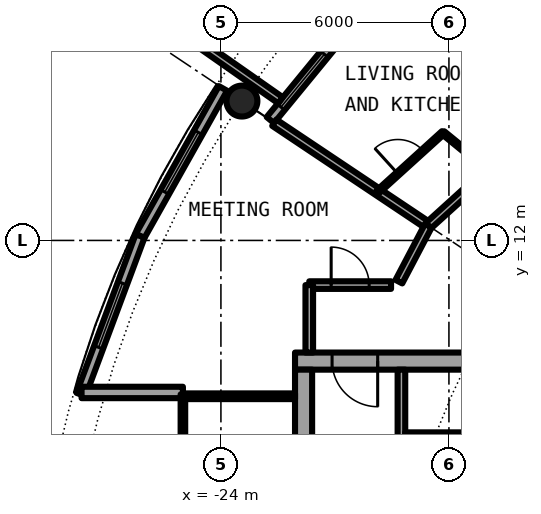
"""IFC4 building model, lengths in metres.
Left out: names, types, materials, properties, quantities, classifications, styles, units other than length and angle.
Written with IfcOpenShell. Run it as: python <this file> out.ifc"""

import sys

from ifc_helpers import new_model, si_unit, direction, frame, frame_2d, origin, origin_2d, place, context, subcontext, project, spatial, rectangle, hollow_circle, extrude, element, fill, save


model = new_model("IFC4")
c1 = context("Model", 3, precision=1e-05, world=origin(), true_north=direction((0.0, 1.0)))
c2 = subcontext(c1, "Body", "Model", "MODEL_VIEW")
j1 = project(units=[si_unit("LENGTHUNIT", "METRE"), si_unit("PLANEANGLEUNIT", "RADIAN")], contexts=[c1])
p1 = place(None, origin())
s1 = spatial("IfcSite", under=j1, at=p1, CompositionType="ELEMENT")
p2 = place(p1, origin())
s2 = spatial("IfcBuilding", under=s1, at=p2, CompositionType="ELEMENT")
p3 = place(p2, frame((0.0, 0.0, 190.2)))
s3 = spatial("IfcBuildingStorey", under=s2, at=p3, CompositionType="ELEMENT", Elevation=190.2)
p4 = place(p3, frame((-23.448, 15.667, 0.0), z_axis=(0.0, 0.0, 1.0), x_axis=(1.0, 0.0, 0.0)))
e1 = element("IfcColumn", 1, at=p4, inside=s3, PredefinedType="COLUMN", context=c2, shape_type="SweptSolid", body=[
    extrude(hollow_circle(Radius=0.406, WallThickness=0.03, at=origin_2d()), origin(), (0.0, 0.0, 1.0), 3.05),
])
p5 = place(p3, frame((-19.304, 19.304, 0.0), z_axis=(0.0, 0.0, 1.0), x_axis=(-0.634382322723, -0.773019449054, 0.0)))
e2 = element("IfcWall", 2, at=p5, inside=s3, PredefinedType="SOLIDWALL", context=c2, shape_type="SweptSolid", body=[
    extrude(rectangle(XDim=5.352, YDim=0.25, at=frame_2d((2.676, 0.0))), origin(), (0.0, 0.0, 1.0), 2.7),
])
p6 = place(p5, frame((0.841, 0.0, 0.0)))
e3 = element("IfcOpeningElement", 3, at=p6, cuts=e2, PredefinedType="OPENING", context=c2, shape_type="SweptSolid", body=[
    extrude(rectangle(XDim=1.0, YDim=2.2, at=frame_2d((0.5, 1.1))), frame((0.0, 0.135, 0.0), z_axis=(0.0, -1.0, 0.0), x_axis=(1.0, 0.0, 0.0)), (0.0, 0.0, 1.0), 0.27),
])
p7 = place(p5, frame((3.111, 0.0, 0.3)))
e4 = element("IfcOpeningElement", 4, at=p7, cuts=e2, PredefinedType="OPENING", context=c2, shape_type="SweptSolid", body=[
    extrude(rectangle(XDim=1.8, YDim=2.1, at=frame_2d((0.9, 1.05))), frame((0.0, 0.135, 0.0), z_axis=(0.0, -1.0, 0.0), x_axis=(1.0, 0.0, 0.0)), (0.0, 0.0, 1.0), 0.27),
])
p8 = place(p3, frame((-22.433, 15.688, -0.03), z_axis=(0.0, 0.0, 1.0), x_axis=(-0.819373043115, 0.573260687834, 0.0)))
e5 = element("IfcWall", 5, at=p8, inside=s3, PredefinedType="SOLIDWALL", context=c2, shape_type="SweptSolid", body=[
    extrude(rectangle(XDim=2.925, YDim=0.2, at=frame_2d((1.463, 0.0))), origin(), (0.0, 0.0, 1.0), 2.73),
])
p9 = place(p3, frame((-23.946, 16.0, 0.0), z_axis=(0.0, 0.0, 1.0), x_axis=(-0.489696356642, -0.871893042919, 0.0)))
e6 = element("IfcWall", 6, at=p9, inside=s3, PredefinedType="SOLIDWALL", context=c2, shape_type="SweptSolid", body=[
    extrude(rectangle(XDim=4.454, YDim=0.25, at=frame_2d((2.227, 0.0))), origin(), (0.0, 0.0, 1.0), 2.7),
])
p10 = place(p9, frame((1.327, 0.0, 0.3)))
e7 = element("IfcOpeningElement", 7, at=p10, cuts=e6, PredefinedType="OPENING", context=c2, shape_type="SweptSolid", body=[
    extrude(rectangle(XDim=1.8, YDim=2.1, at=frame_2d((0.9, 1.05))), frame((0.0, 0.135, 0.0), z_axis=(0.0, -1.0, 0.0), x_axis=(1.0, 0.0, 0.0)), (0.0, 0.0, 1.0), 0.27),
])
p11 = place(p3, frame((-26.127, 12.117, 0.0), z_axis=(0.0, 0.0, 1.0), x_axis=(-0.349247811493, -0.937030397675, 0.0)))
e8 = element("IfcWall", 8, at=p11, inside=s3, PredefinedType="SOLIDWALL", context=c2, shape_type="SweptSolid", body=[
    extrude(rectangle(XDim=4.452, YDim=0.25, at=frame_2d((2.226, 0.0))), origin(), (0.0, 0.0, 1.0), 2.7),
])
p12 = place(p11, frame((1.327, 0.0, 0.3)))
e9 = element("IfcOpeningElement", 9, at=p12, cuts=e8, PredefinedType="OPENING", context=c2, shape_type="SweptSolid", body=[
    extrude(rectangle(XDim=1.8, YDim=2.1, at=frame_2d((0.9, 1.05))), frame((0.0, 0.135, 0.0), z_axis=(0.0, -1.0, 0.0), x_axis=(1.0, 0.0, 0.0)), (0.0, 0.0, 1.0), 0.27),
])
p13 = place(p3, frame((-25.0, 8.0, 0.0), z_axis=(0.0, 0.0, 1.0), x_axis=(-1.0, 0.0, 0.0)))
e10 = element("IfcWall", 10, at=p13, inside=s3, PredefinedType="SOLIDWALL", context=c2, shape_type="SweptSolid", body=[
    extrude(rectangle(XDim=2.667, YDim=0.3, at=frame_2d((1.333, 0.0))), origin(), (0.0, 0.0, 1.0), 2.7),
])
p14 = place(p3, frame((-8.55, 8.825, 0.0), z_axis=(0.0, 0.0, 1.0), x_axis=(-1.0, 0.0, 0.0)))
e11 = element("IfcWall", 11, at=p14, inside=s3, PredefinedType="SHEAR", context=c2, shape_type="SweptSolid", body=[
    extrude(rectangle(XDim=13.5, YDim=0.45, at=frame_2d((6.75, 0.0))), origin(), (0.0, 0.0, 1.0), 3.05),
])
p15 = place(p14, frame((11.325, 0.0, 0.0)))
e12 = element("IfcOpeningElement", 12, at=p15, cuts=e11, PredefinedType="OPENING", context=c2, shape_type="SweptSolid", body=[
    extrude(rectangle(XDim=1.2, YDim=2.3, at=frame_2d((0.6, 1.15))), frame((0.0, 0.235, 0.0), z_axis=(0.0, -1.0, 0.0), x_axis=(1.0, 0.0, 0.0)), (0.0, 0.0, 1.0), 0.47),
])
p16 = place(p3, frame((-21.825, -8.6, 0.0), z_axis=(0.0, 0.0, 1.0), x_axis=(0.0, 1.0, 0.0)))
e13 = element("IfcWall", 13, at=p16, inside=s3, PredefinedType="SHEAR", context=c2, shape_type="SweptSolid", body=[
    extrude(rectangle(XDim=17.2, YDim=0.45, at=frame_2d((8.6, 0.0))), origin(), (0.0, 0.0, 1.0), 3.05),
])
p17 = place(p16, frame((7.7, 0.0, 0.0)))
e14 = element("IfcOpeningElement", 14, at=p17, cuts=e13, PredefinedType="OPENING", context=c2, shape_type="SweptSolid", body=[
    extrude(rectangle(XDim=1.8, YDim=2.3, at=frame_2d((0.9, 1.15))), frame((0.0, 0.235, 0.0), z_axis=(0.0, -1.0, 0.0), x_axis=(1.0, 0.0, 0.0)), (0.0, 0.0, 1.0), 0.47),
])
p18 = place(p3, frame((-19.25, 8.6, 0.0), z_axis=(0.0, 0.0, 1.0), x_axis=(0.0, -1.0, 0.0)))
e15 = element("IfcWall", 15, at=p18, inside=s3, PredefinedType="SOLIDWALL", context=c2, shape_type="SweptSolid", body=[
    extrude(rectangle(XDim=7.025, YDim=0.2, at=frame_2d((3.513, 0.0))), origin(), (0.0, 0.0, 1.0), 2.7),
])
p19 = place(p18, frame((2.35, 0.0, 0.0)))
e16 = element("IfcOpeningElement", 16, at=p19, cuts=e15, PredefinedType="OPENING", context=c2, shape_type="SweptSolid", body=[
    extrude(rectangle(XDim=1.1, YDim=2.3, at=frame_2d((0.55, 1.15))), frame((0.0, 0.11, 0.0), z_axis=(0.0, -1.0, 0.0), x_axis=(1.0, 0.0, 0.0)), (0.0, 0.0, 1.0), 0.22),
])
p20 = place(p3, frame((-15.45, 6.875, 0.0), z_axis=(0.0, 0.0, 1.0), x_axis=(-1.0, 0.0, 0.0)))
e17 = element("IfcWall", 17, at=p20, inside=s3, PredefinedType="PARTITIONING", context=c2, shape_type="SweptSolid", body=[
    extrude(rectangle(XDim=3.7, YDim=0.15, at=frame_2d((1.85, 0.0))), origin(), (0.0, 0.0, 1.0), 2.7),
])
p21 = place(p20, frame((1.4, 0.0, 0.0)))
e18 = element("IfcOpeningElement", 18, at=p21, cuts=e17, PredefinedType="OPENING", context=c2, shape_type="SweptSolid", body=[
    extrude(rectangle(XDim=0.9, YDim=2.3, at=frame_2d((0.45, 1.15))), frame((0.0, 0.085, 0.0), z_axis=(0.0, -1.0, 0.0), x_axis=(1.0, 0.0, 0.0)), (0.0, 0.0, 1.0), 0.17),
])
p22 = place(p3, frame((-22.05, 7.9, 0.0), z_axis=(0.0, 0.0, 1.0), x_axis=(-1.0, 0.0, 0.0)))
e19 = element("IfcWall", 19, at=p22, inside=s3, PredefinedType="PARTITIONING", context=c2, shape_type="SweptSolid", body=[
    extrude(rectangle(XDim=2.89, YDim=0.15, at=frame_2d((1.445, 0.0))), origin(), (0.0, 0.0, 1.0), 2.7),
])
p23 = place(p3, frame((-25.0, 7.95, 0.0), z_axis=(0.0, 0.0, 1.0), x_axis=(0.0, -1.0, 0.0)))
e20 = element("IfcWall", 20, at=p23, inside=s3, PredefinedType="PARTITIONING", context=c2, shape_type="SweptSolid", body=[
    extrude(rectangle(XDim=15.9, YDim=0.12, at=frame_2d((7.95, 0.0))), origin(), (0.0, 0.0, 1.0), 2.7),
])
p24 = place(p23, frame((0.95, 0.0, 0.1)))
e21 = element("IfcOpeningElement", 21, at=p24, cuts=e20, PredefinedType="OPENING", context=c2, shape_type="SweptSolid", body=[
    extrude(rectangle(XDim=14.0, YDim=2.35, at=frame_2d((7.0, 1.175))), frame((0.0, 0.07, 0.0), z_axis=(0.0, -1.0, 0.0), x_axis=(1.0, 0.0, 0.0)), (0.0, 0.0, 1.0), 0.14),
])
p25 = place(p3, frame((-22.595, 15.098, 0.0), z_axis=(0.0, 0.0, 1.0), x_axis=(0.831387096605, -0.55569370664, 0.0)))
e22 = element("IfcWall", 22, at=p25, inside=s3, PredefinedType="PARTITIONING", context=c2, shape_type="SweptSolid", body=[
    extrude(rectangle(XDim=4.875, YDim=0.2, at=frame_2d((2.438, 0.0))), origin(), (0.0, 0.0, 1.0), 2.7),
])
p26 = place(p3, frame((-19.234, 19.197, 0.0), z_axis=(0.0, 0.0, 1.0), x_axis=(0.707722727509, -0.706490297858, 0.0)))
e23 = element("IfcWall", 23, at=p26, inside=s3, PredefinedType="PARTITIONING", context=c2, shape_type="SweptSolid", body=[
    extrude(rectangle(XDim=3.962, YDim=0.1, at=frame_2d((1.981, 0.0))), origin(), (0.0, 0.0, 1.0), 2.7),
])
p27 = place(p26, frame((1.531, 0.0, 0.0)))
e24 = element("IfcOpeningElement", 24, at=p27, cuts=e23, PredefinedType="OPENING", context=c2, shape_type="SweptSolid", body=[
    extrude(rectangle(XDim=0.9, YDim=2.3, at=frame_2d((0.45, 1.15))), frame((0.0, 0.06, 0.0), z_axis=(0.0, -1.0, 0.0), x_axis=(1.0, 0.0, 0.0)), (0.0, 0.0, 1.0), 0.12),
])
p28 = place(p3, frame((-18.154, 14.834, 0.0), z_axis=(0.0, 0.0, 1.0), x_axis=(0.774345345452, -0.632763214779, 0.0)))
e25 = element("IfcWall", 25, at=p28, inside=s3, PredefinedType="PARTITIONING", context=c2, shape_type="SweptSolid", body=[
    extrude(rectangle(XDim=1.569, YDim=0.1, at=frame_2d((0.785, 0.0))), origin(), (0.0, 0.0, 1.0), 2.7),
])
p29 = place(p3, frame((-21.675, 10.825, 0.0), z_axis=(0.0, 0.0, 1.0), x_axis=(1.0, 0.0, 0.0)))
e26 = element("IfcWall", 26, at=p29, inside=s3, PredefinedType="PARTITIONING", context=c2, shape_type="SweptSolid", body=[
    extrude(rectangle(XDim=2.152, YDim=0.2, at=frame_2d((1.076, 0.0))), origin(), (0.0, 0.0, 1.0), 2.7),
])
p30 = place(p29, frame((0.576, 0.0, 0.0)))
e27 = element("IfcOpeningElement", 27, at=p30, cuts=e26, PredefinedType="OPENING", context=c2, shape_type="SweptSolid", body=[
    extrude(rectangle(XDim=1.0, YDim=2.3, at=frame_2d((0.5, 1.15))), frame((0.0, 0.11, 0.0), z_axis=(0.0, -1.0, 0.0), x_axis=(1.0, 0.0, 0.0)), (0.0, 0.0, 1.0), 0.22),
])
p31 = place(p3, frame((-18.543, 12.386, 0.0), z_axis=(0.0, 0.0, 1.0), x_axis=(0.740853508928, 0.671666642248, 0.0)))
e28 = element("IfcWall", 28, at=p31, inside=s3, PredefinedType="PARTITIONING", context=c2, shape_type="SweptSolid", body=[
    extrude(rectangle(XDim=10.84, YDim=0.2, at=frame_2d((5.42, 0.0))), origin(), (0.0, 0.0, 1.0), 2.7),
])
p32 = place(p31, frame((4.921, 0.0, 0.0)))
e29 = element("IfcOpeningElement", 29, at=p32, cuts=e28, PredefinedType="OPENING", context=c2, shape_type="SweptSolid", body=[
    extrude(rectangle(XDim=1.0, YDim=2.3, at=frame_2d((0.5, 1.15))), frame((0.0, 0.11, 0.0), z_axis=(0.0, -1.0, 0.0), x_axis=(1.0, 0.0, 0.0)), (0.0, 0.0, 1.0), 0.22),
])
p33 = place(p3, frame((-21.675, 9.05, 0.0), z_axis=(0.0, 0.0, 1.0), x_axis=(0.0, 1.0, 0.0)))
e30 = element("IfcWall", 30, at=p33, inside=s3, PredefinedType="PARTITIONING", context=c2, shape_type="SweptSolid", body=[
    extrude(rectangle(XDim=1.775, YDim=0.2, at=frame_2d((0.887, 0.0))), origin(), (0.0, 0.0, 1.0), 2.7),
])
p34 = place(p3, frame((-19.317, 10.915, 0.0), z_axis=(0.0, 0.0, 1.0), x_axis=(0.465359652486, 0.885121683068, 0.0)))
e31 = element("IfcWall", 31, at=p34, inside=s3, PredefinedType="PARTITIONING", context=c2, shape_type="SweptSolid", body=[
    extrude(rectangle(XDim=1.665, YDim=0.2, at=frame_2d((0.833, 0.0))), origin(), (0.0, 0.0, 1.0), 2.7),
])
p35 = place(p3, frame((-19.872, 13.278, 0.0), z_axis=(0.0, 0.0, 1.0), x_axis=(0.740990220108, 0.671515817911, 0.0)))
e32 = element("IfcWall", 32, at=p35, inside=s3, PredefinedType="PARTITIONING", context=c2, shape_type="SweptSolid", body=[
    extrude(rectangle(XDim=2.323, YDim=0.1, at=frame_2d((1.161, 0.0))), origin(), (0.0, 0.0, 1.0), 2.7),
])
p36 = place(p35, frame((0.711, 0.0, 0.0)))
e33 = element("IfcOpeningElement", 33, at=p36, cuts=e32, PredefinedType="OPENING", context=c2, shape_type="SweptSolid", body=[
    extrude(rectangle(XDim=0.9, YDim=2.3, at=frame_2d((0.45, 1.15))), frame((0.0, 0.06, 0.0), z_axis=(0.0, -1.0, 0.0), x_axis=(1.0, 0.0, 0.0)), (0.0, 0.0, 1.0), 0.12),
])
p37 = place(p7, origin())
e34 = element("IfcWindow", 34, at=p37, inside=s3, PartitioningType="SINGLE_PANEL", PredefinedType="WINDOW", context=c2, shape_type="SweptSolid", body=[
    extrude(rectangle(XDim=1.8, YDim=2.1, at=frame_2d((0.9, 1.05))), frame((0.0, 0.03, 0.0), z_axis=(0.0, -1.0, 0.0), x_axis=(1.0, 0.0, 0.0)), (0.0, 0.0, 1.0), 0.06),
])
fill(e4, e34)
p38 = place(p10, origin())
e35 = element("IfcWindow", 35, at=p38, inside=s3, PartitioningType="SINGLE_PANEL", PredefinedType="WINDOW", context=c2, shape_type="SweptSolid", body=[
    extrude(rectangle(XDim=1.8, YDim=2.1, at=frame_2d((0.9, 1.05))), frame((0.0, 0.03, 0.0), z_axis=(0.0, -1.0, 0.0), x_axis=(1.0, 0.0, 0.0)), (0.0, 0.0, 1.0), 0.06),
])
fill(e7, e35)
p39 = place(p12, origin())
e36 = element("IfcWindow", 36, at=p39, inside=s3, PartitioningType="SINGLE_PANEL", PredefinedType="WINDOW", context=c2, shape_type="SweptSolid", body=[
    extrude(rectangle(XDim=1.8, YDim=2.1, at=frame_2d((0.9, 1.05))), frame((0.0, 0.03, 0.0), z_axis=(0.0, -1.0, 0.0), x_axis=(1.0, 0.0, 0.0)), (0.0, 0.0, 1.0), 0.06),
])
fill(e9, e36)
p40 = place(p21, origin())
e37 = element("IfcDoor", 37, at=p40, inside=s3, OperationType="SINGLE_SWING_LEFT", PredefinedType="DOOR", context=c2, shape_type="SweptSolid", body=[
    extrude(rectangle(XDim=0.9, YDim=2.3, at=frame_2d((0.45, 1.15))), frame((0.0, 0.025, 0.0), z_axis=(0.0, -1.0, 0.0), x_axis=(1.0, 0.0, 0.0)), (0.0, 0.0, 1.0), 0.05),
])
fill(e18, e37)
p41 = place(p15, origin())
e38 = element("IfcDoor", 38, at=p41, inside=s3, OperationType="SINGLE_SWING_LEFT", PredefinedType="DOOR", context=c2, shape_type="SweptSolid", body=[
    extrude(rectangle(XDim=1.2, YDim=2.3, at=frame_2d((0.6, 1.15))), frame((0.0, 0.025, 0.0), z_axis=(0.0, -1.0, 0.0), x_axis=(1.0, 0.0, 0.0)), (0.0, 0.0, 1.0), 0.05),
])
fill(e12, e38)
p42 = place(p24, origin())
e39 = element("IfcWindow", 39, at=p42, inside=s3, PartitioningType="SINGLE_PANEL", PredefinedType="WINDOW", context=c2, shape_type="SweptSolid", body=[
    extrude(rectangle(XDim=14.0, YDim=2.35, at=frame_2d((7.0, 1.175))), frame((0.0, 0.03, 0.0), z_axis=(0.0, -1.0, 0.0), x_axis=(1.0, 0.0, 0.0)), (0.0, 0.0, 1.0), 0.06),
])
fill(e21, e39)
p43 = place(p36, origin())
e40 = element("IfcDoor", 40, at=p43, inside=s3, OperationType="SINGLE_SWING_LEFT", PredefinedType="DOOR", context=c2, shape_type="SweptSolid", body=[
    extrude(rectangle(XDim=0.9, YDim=2.3, at=frame_2d((0.45, 1.15))), frame((0.0, 0.025, 0.0), z_axis=(0.0, -1.0, 0.0), x_axis=(1.0, 0.0, 0.0)), (0.0, 0.0, 1.0), 0.05),
])
fill(e33, e40)
p44 = place(p30, origin())
e41 = element("IfcDoor", 41, at=p44, inside=s3, OperationType="SINGLE_SWING_LEFT", PredefinedType="DOOR", context=c2, shape_type="SweptSolid", body=[
    extrude(rectangle(XDim=1.0, YDim=2.3, at=frame_2d((0.5, 1.15))), frame((0.0, 0.025, 0.0), z_axis=(0.0, -1.0, 0.0), x_axis=(1.0, 0.0, 0.0)), (0.0, 0.0, 1.0), 0.05),
])
fill(e27, e41)
save(model, sys.argv[1])
